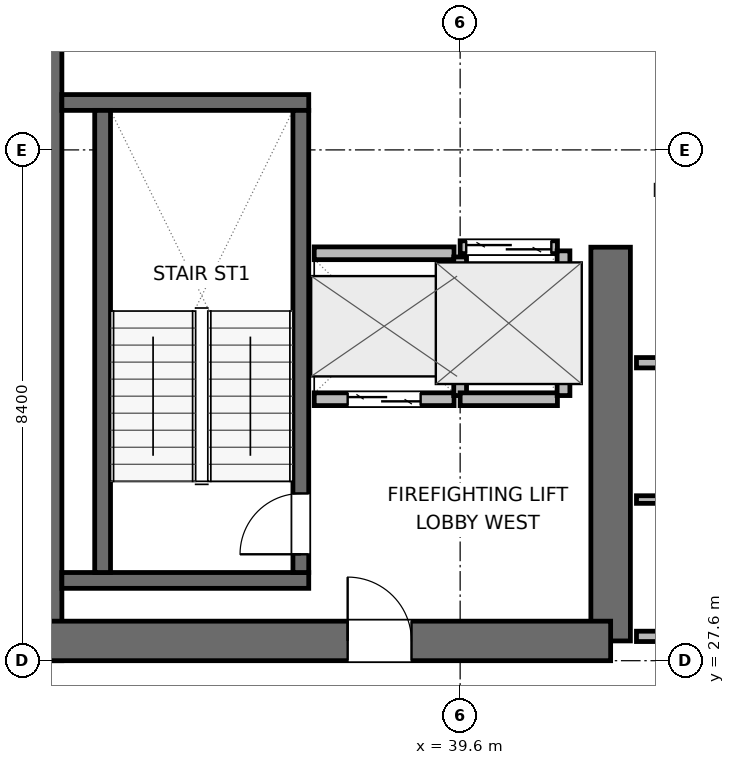
"""IFC4 building model, lengths in metres.
Left out: names, types, materials, properties, quantities, classifications, styles, units other than length and angle.
Written with IfcOpenShell. Run it as: python <this file> out.ifc"""

import sys

from ifc_helpers import new_model, si_unit, direction, frame, frame_2d, origin, place, context, subcontext, project, spatial, rectangle, extrude, element, fill, save


model = new_model("IFC4")
c1 = context("Model", 3, precision=1e-05, world=origin(), true_north=direction((0.0, 1.0)))
c2 = subcontext(c1, "Body", "Model", "MODEL_VIEW")
j1 = project(units=[si_unit("LENGTHUNIT", "METRE"), si_unit("PLANEANGLEUNIT", "RADIAN")], contexts=[c1])
p1 = place(None, origin())
s1 = spatial("IfcSite", under=j1, at=p1, CompositionType="ELEMENT")
p2 = place(p1, origin())
s2 = spatial("IfcBuilding", under=s1, at=p2, CompositionType="ELEMENT")
p3 = place(p2, frame((0.0, 0.0, 190.2)))
s3 = spatial("IfcBuildingStorey", under=s2, at=p3, CompositionType="ELEMENT", Elevation=190.2)
p4 = place(p3, frame((32.725, 27.6, 0.0), z_axis=(0.0, 0.0, 1.0), x_axis=(0.0, 1.0, 0.0)))
e1 = element("IfcWall", 1, at=p4, inside=s3, PredefinedType="SHEAR", context=c2, shape_type="SweptSolid", body=[
    extrude(rectangle(XDim=16.8, YDim=0.65, at=frame_2d((8.4, 0.0))), origin(), (0.0, 0.0, 1.0), 3.9),
])
p5 = place(p3, frame((42.075, 27.925, 0.0), z_axis=(0.0, 0.0, 1.0), x_axis=(0.0, 1.0, 0.0)))
e2 = element("IfcWall", 2, at=p5, inside=s3, PredefinedType="SHEAR", context=c2, shape_type="SweptSolid", body=[
    extrude(rectangle(XDim=6.475, YDim=0.65, at=frame_2d((3.237, 0.0))), origin(), (0.0, 0.0, 1.0), 3.9),
])
p6 = place(p3, frame((32.725, 27.925, 0.0), z_axis=(0.0, 0.0, 1.0), x_axis=(1.0, 0.0, 0.0)))
e3 = element("IfcWall", 3, at=p6, inside=s3, PredefinedType="SHEAR", context=c2, shape_type="SweptSolid", body=[
    extrude(rectangle(XDim=9.35, YDim=0.65, at=frame_2d((4.675, 0.0))), origin(), (0.0, 0.0, 1.0), 3.9),
])
p7 = place(p6, frame((5.025, 0.0, 0.0)))
e4 = element("IfcOpeningElement", 4, at=p7, cuts=e3, PredefinedType="OPENING", context=c2, shape_type="SweptSolid", body=[
    extrude(rectangle(XDim=1.05, YDim=2.04, at=frame_2d((0.525, 1.02))), frame((0.0, 0.335, 0.0), z_axis=(0.0, -1.0, 0.0), x_axis=(1.0, 0.0, 0.0)), (0.0, 0.0, 1.0), 0.67),
])
for number, where, z_axis, x_axis in (
    (5, (33.05, 28.92, 0.0), (0.0, 0.0, 1.0), (1.0, 0.0, 0.0)),
    (6, (33.05, 36.78, 0.0), (0.0, 0.0, 1.0), (1.0, 0.0, 0.0)),
):
    element("IfcWall", number, at=place(p3, frame(where, z_axis=z_axis, x_axis=x_axis)), inside=s3, PredefinedType="SHEAR", context=c2, shape_type="SweptSolid", body=[
        extrude(rectangle(XDim=4.06, YDim=0.26, at=frame_2d((2.03, 0.0))), origin(), (0.0, 0.0, 1.0), 3.9),
    ])
p8 = place(p3, frame((33.72, 29.05, 0.0), z_axis=(0.0, 0.0, 1.0), x_axis=(0.0, 1.0, 0.0)))
e7 = element("IfcWall", 7, at=p8, inside=s3, PredefinedType="SHEAR", context=c2, shape_type="SweptSolid", body=[
    extrude(rectangle(XDim=7.6, YDim=0.26, at=frame_2d((3.8, 0.0))), origin(), (0.0, 0.0, 1.0), 3.9),
])
p9 = place(p3, frame((36.98, 29.05, 0.0), z_axis=(0.0, 0.0, 1.0), x_axis=(0.0, 1.0, 0.0)))
e8 = element("IfcWall", 8, at=p9, inside=s3, PredefinedType="SHEAR", context=c2, shape_type="SweptSolid", body=[
    extrude(rectangle(XDim=7.6, YDim=0.26, at=frame_2d((3.8, 0.0))), origin(), (0.0, 0.0, 1.0), 3.9),
])
p10 = place(p9, frame((0.3, 0.0, 0.0)))
e9 = element("IfcOpeningElement", 9, at=p10, cuts=e8, PredefinedType="OPENING", context=c2, shape_type="SweptSolid", body=[
    extrude(rectangle(XDim=1.0, YDim=2.04, at=frame_2d((0.5, 1.02))), frame((0.0, 0.14, 0.0), z_axis=(0.0, -1.0, 0.0), x_axis=(1.0, 0.0, 0.0)), (0.0, 0.0, 1.0), 0.28),
])
p11 = place(p3, frame((37.2, 31.9, 0.0), z_axis=(0.0, 0.0, 1.0), x_axis=(1.0, 0.0, 0.0)))
e10 = element("IfcWall", 10, at=p11, inside=s3, PredefinedType="PARTITIONING", context=c2, shape_type="SweptSolid", body=[
    extrude(rectangle(XDim=2.3, YDim=0.21, at=frame_2d((1.15, 0.0))), origin(), (0.0, 0.0, 1.0), 3.68),
])
p12 = place(p11, frame((0.55, 0.0, 0.0)))
e11 = element("IfcOpeningElement", 11, at=p12, cuts=e10, PredefinedType="OPENING", context=c2, shape_type="SweptSolid", body=[
    extrude(rectangle(XDim=1.2, YDim=2.04, at=frame_2d((0.6, 1.02))), frame((0.0, 0.115, 0.0), z_axis=(0.0, -1.0, 0.0), x_axis=(1.0, 0.0, 0.0)), (0.0, 0.0, 1.0), 0.23),
])
p13 = place(p3, frame((37.2, 34.3, 0.0), z_axis=(0.0, 0.0, 1.0), x_axis=(1.0, 0.0, 0.0)))
e12 = element("IfcWall", 12, at=p13, inside=s3, PredefinedType="PARTITIONING", context=c2, shape_type="SweptSolid", body=[
    extrude(rectangle(XDim=2.3, YDim=0.21, at=frame_2d((1.15, 0.0))), origin(), (0.0, 0.0, 1.0), 3.68),
])
p14 = place(p3, frame((39.6, 31.96, 0.0), z_axis=(0.0, 0.0, 1.0), x_axis=(0.0, 1.0, 0.0)))
e13 = element("IfcWall", 13, at=p14, inside=s3, PredefinedType="PARTITIONING", context=c2, shape_type="SweptSolid", body=[
    extrude(rectangle(XDim=2.28, YDim=0.21, at=frame_2d((1.14, 0.0))), origin(), (0.0, 0.0, 1.0), 3.68),
])
p15 = place(p3, frame((39.6, 34.4, 0.0), z_axis=(0.0, 0.0, 1.0), x_axis=(1.0, 0.0, 0.0)))
e14 = element("IfcWall", 14, at=p15, inside=s3, PredefinedType="PARTITIONING", context=c2, shape_type="SweptSolid", body=[
    extrude(rectangle(XDim=1.6, YDim=0.21, at=frame_2d((0.8, 0.0))), origin(), (0.0, 0.0, 1.0), 3.68),
])
p16 = place(p15, frame((0.1, 0.0, 0.0)))
e15 = element("IfcOpeningElement", 15, at=p16, cuts=e14, PredefinedType="OPENING", context=c2, shape_type="SweptSolid", body=[
    extrude(rectangle(XDim=1.4, YDim=2.06, at=frame_2d((0.7, 1.03))), frame((0.0, 0.115, 0.0), z_axis=(0.0, -1.0, 0.0), x_axis=(1.0, 0.0, 0.0)), (0.0, 0.0, 1.0), 0.23),
])
p17 = place(p3, frame((39.6, 31.9, 0.0), z_axis=(0.0, 0.0, 1.0), x_axis=(1.0, 0.0, 0.0)))
e16 = element("IfcWall", 16, at=p17, inside=s3, PredefinedType="PARTITIONING", context=c2, shape_type="SweptSolid", body=[
    extrude(rectangle(XDim=1.6, YDim=0.21, at=frame_2d((0.8, 0.0))), origin(), (0.0, 0.0, 1.0), 3.68),
])
p18 = place(p3, frame((41.3, 31.96, 0.0), z_axis=(0.0, 0.0, 1.0), x_axis=(0.0, 1.0, 0.0)))
e17 = element("IfcWall", 17, at=p18, inside=s3, PredefinedType="PARTITIONING", context=c2, shape_type="SweptSolid", body=[
    extrude(rectangle(XDim=2.38, YDim=0.21, at=frame_2d((1.19, 0.0))), origin(), (0.0, 0.0, 1.0), 3.68),
])
p19 = place(p3, frame((42.5, 28.0, 0.0), z_axis=(0.0, 0.0, 1.0), x_axis=(1.0, 0.0, 0.0)))
e18 = element("IfcWall", 18, at=p19, inside=s3, PredefinedType="PARTITIONING", context=c2, shape_type="SweptSolid", body=[
    extrude(rectangle(XDim=4.213, YDim=0.17, at=frame_2d((2.106, 0.0))), origin(), (0.0, 0.0, 1.0), 2.765),
])
p20 = place(p3, frame((42.5, 32.5, 0.0), z_axis=(0.0, 0.0, 1.0), x_axis=(1.0, 0.0, 0.0)))
e19 = element("IfcWall", 19, at=p20, inside=s3, PredefinedType="PARTITIONING", context=c2, shape_type="SweptSolid", body=[
    extrude(rectangle(XDim=1.3, YDim=0.17, at=frame_2d((0.65, 0.0))), origin(), (0.0, 0.0, 1.0), 3.68),
])
p21 = place(p3, frame((42.5, 30.25, 0.0), z_axis=(0.0, 0.0, 1.0), x_axis=(1.0, 0.0, 0.0)))
e20 = element("IfcWall", 20, at=p21, inside=s3, PredefinedType="PARTITIONING", context=c2, shape_type="SweptSolid", body=[
    extrude(rectangle(XDim=4.213, YDim=0.125, at=frame_2d((2.106, 0.0))), origin(), (0.0, 0.0, 1.0), 3.68),
])
p22 = place(p10, origin())
e21 = element("IfcDoor", 21, at=p22, inside=s3, OperationType="SINGLE_SWING_LEFT", PredefinedType="DOOR", context=c2, shape_type="SweptSolid", body=[
    extrude(rectangle(XDim=1.0, YDim=2.04, at=frame_2d((0.5, 1.02))), frame((0.0, 0.025, 0.0), z_axis=(0.0, -1.0, 0.0), x_axis=(1.0, 0.0, 0.0)), (0.0, 0.0, 1.0), 0.05),
])
fill(e9, e21)
p23 = place(p12, origin())
e22 = element("IfcDoor", 22, at=p23, inside=s3, OperationType="DOUBLE_DOOR_SLIDING", PredefinedType="DOOR", context=c2, shape_type="SweptSolid", body=[
    extrude(rectangle(XDim=1.2, YDim=2.04, at=frame_2d((0.6, 1.02))), frame((0.0, 0.025, 0.0), z_axis=(0.0, -1.0, 0.0), x_axis=(1.0, 0.0, 0.0)), (0.0, 0.0, 1.0), 0.05),
])
fill(e11, e22)
p24 = place(p16, origin())
e23 = element("IfcDoor", 23, at=p24, inside=s3, OperationType="DOUBLE_DOOR_SLIDING", PredefinedType="DOOR", context=c2, shape_type="SweptSolid", body=[
    extrude(rectangle(XDim=1.4, YDim=2.06, at=frame_2d((0.7, 1.03))), frame((0.0, 0.025, 0.0), z_axis=(0.0, -1.0, 0.0), x_axis=(1.0, 0.0, 0.0)), (0.0, 0.0, 1.0), 0.05),
])
fill(e15, e23)
p25 = place(p7, origin())
e24 = element("IfcDoor", 24, at=p25, inside=s3, OperationType="SINGLE_SWING_LEFT", PredefinedType="DOOR", context=c2, shape_type="SweptSolid", body=[
    extrude(rectangle(XDim=1.05, YDim=2.04, at=frame_2d((0.525, 1.02))), frame((0.0, 0.025, 0.0), z_axis=(0.0, -1.0, 0.0), x_axis=(1.0, 0.0, 0.0)), (0.0, 0.0, 1.0), 0.05),
])
fill(e4, e24)
save(model, sys.argv[1])
